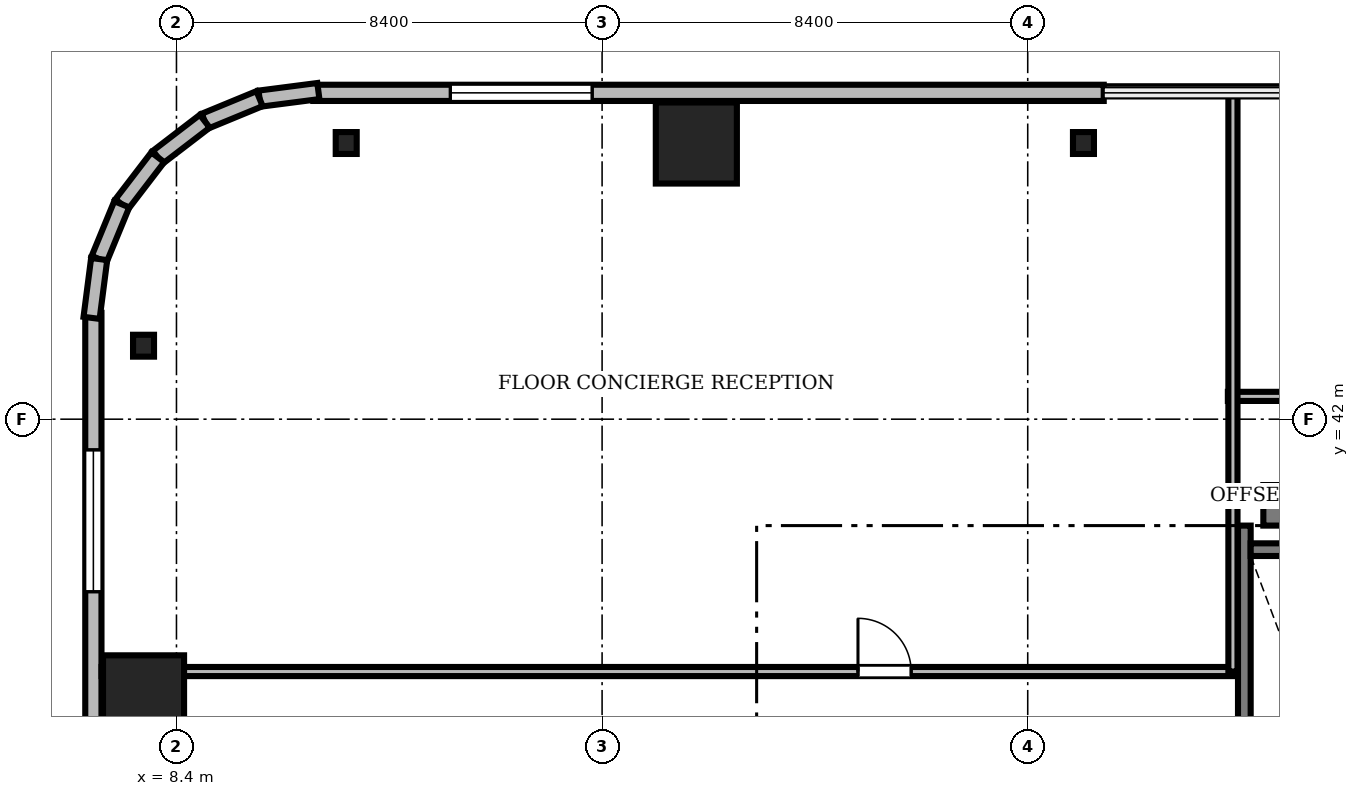
"""IFC4 building model, lengths in metres.
Left out: names, types, materials, properties, quantities, classifications, styles, units other than length and angle.
Written with IfcOpenShell. Run it as: python <this file> out.ifc"""

import sys

from ifc_helpers import new_model, si_unit, direction, frame, frame_2d, origin, origin_2d, place, context, subcontext, project, spatial, rectangle, i_section, extrude, source, transform, mapped, element, fill, save


model = new_model("IFC4")
c1 = context("Model", 3, precision=1e-05, world=origin(), true_north=direction((0.0, 1.0)))
c2 = subcontext(c1, "Body", "Model", "MODEL_VIEW")
j1 = project(units=[si_unit("LENGTHUNIT", "METRE"), si_unit("PLANEANGLEUNIT", "RADIAN")], contexts=[c1])
p1 = place(None, origin())
s1 = spatial("IfcSite", under=j1, at=p1, CompositionType="ELEMENT")
p2 = place(p1, origin())
s2 = spatial("IfcBuilding", under=s1, at=p2, CompositionType="ELEMENT")
p3 = place(p2, frame((0.0, 0.0, 155.7)))
s3 = spatial("IfcBuildingStorey", under=s2, at=p3, CompositionType="ELEMENT", Elevation=155.7)
m1 = source(origin(), c2, "Body", "SweptSolid", [
    extrude(rectangle(XDim=17.52, YDim=0.8, at=frame_2d((8.76, 0.0))), origin(), (0.0, 0.0, 1.0), 3.46),
])
p4 = place(p3, frame((29.85, 40.3, 0.0), z_axis=(0.0, 0.0, 1.0), x_axis=(1.0, 0.0, 0.0)))
e1 = element("IfcWall", 1, at=p4, inside=s3, PredefinedType="SHEAR", context=c2, shape_type="MappedRepresentation", body=[
    mapped(m1, transform((0.0, 0.0, 0.0), scale=1.0)),
])
m2 = source(origin(), c2, "Body", "SweptSolid", [
    extrude(rectangle(XDim=1.6, YDim=1.6, at=origin_2d()), origin(), (0.0, 0.0, 1.0), 3.46),
])
for number, where, z_axis, x_axis in (
    (2, (18.66, 47.45, 0.0), (0.0, 0.0, 1.0), (1.0, 0.0, 0.0)),
    (3, (7.75, 36.54, 0.0), (0.0, 0.0, 1.0), (1.0, 0.0, 0.0)),
):
    element("IfcColumn", number, at=place(p3, frame(where, z_axis=z_axis, x_axis=x_axis)), inside=s3, PredefinedType="COLUMN", context=c2, shape_type="MappedRepresentation", body=[
        mapped(m2, transform((0.0, 0.0, 0.0), scale=1.0)),
    ])
m3 = source(origin(), c2, "Body", "SweptSolid", [
    extrude(i_section(OverallWidth=0.414, OverallDepth=0.432, WebThickness=0.026, FlangeThickness=0.04, FilletRadius=0.015, at=origin_2d()), origin(), (0.0, 0.0, 1.0), 3.46),
])
for number, where, z_axis, x_axis in (
    (4, (26.3, 47.45, 0.0), (0.0, 0.0, 1.0), (1.0, 0.0, 0.0)),
    (5, (11.75, 47.45, 0.0), (0.0, 0.0, 1.0), (1.0, 0.0, 0.0)),
    (6, (7.75, 43.45, 0.0), (0.0, 0.0, 1.0), (1.0, 0.0, 0.0)),
):
    element("IfcColumn", number, at=place(p3, frame(where, z_axis=z_axis, x_axis=x_axis)), inside=s3, PredefinedType="COLUMN", context=c2, shape_type="MappedRepresentation", body=[
        mapped(m3, transform((0.0, 0.0, 0.0), scale=1.0)),
    ])
m4 = source(origin(), c2, "Body", "SweptSolid", [
    extrude(rectangle(XDim=15.6, YDim=0.32, at=frame_2d((7.8, 0.0))), origin(), (0.0, 0.0, 1.0), 3.46),
])
p5 = place(p3, frame((26.7, 48.44, 0.0), z_axis=(0.0, 0.0, 1.0), x_axis=(-1.0, 0.0, 0.0)))
e7 = element("IfcWall", 7, at=p5, inside=s3, PredefinedType="SOLIDWALL", context=c2, shape_type="MappedRepresentation", body=[
    mapped(m4, transform((0.0, 0.0, 0.0), scale=1.0)),
])
m5 = source(origin(), c2, "Body", "SweptSolid", [
    extrude(rectangle(XDim=2.8, YDim=2.4, at=frame_2d((1.4, 1.2))), frame((0.0, 0.17, 0.0), z_axis=(0.0, -1.0, 0.0), x_axis=(1.0, 0.0, 0.0)), (0.0, 0.0, 1.0), 0.34),
])
p6 = place(p5, frame((10.095, 0.0, 0.72)))
e8 = element("IfcOpeningElement", 8, at=p6, cuts=e7, PredefinedType="OPENING", context=c2, shape_type="MappedRepresentation", body=[
    mapped(m5, transform((0.0, 0.0, 0.0), scale=1.0)),
])
m6 = source(origin(), c2, "Body", "SweptSolid", [
    extrude(rectangle(XDim=15.6, YDim=0.32, at=frame_2d((7.8, 0.0))), origin(), (0.0, 0.0, 1.0), 3.46),
])
p7 = place(p3, frame((6.76, 44.1, 0.0), z_axis=(0.0, 0.0, 1.0), x_axis=(0.0, -1.0, 0.0)))
e9 = element("IfcWall", 9, at=p7, inside=s3, PredefinedType="SOLIDWALL", context=c2, shape_type="MappedRepresentation", body=[
    mapped(m6, transform((0.0, 0.0, 0.0), scale=1.0)),
])
m7 = source(origin(), c2, "Body", "SweptSolid", [
    extrude(rectangle(XDim=1.4, YDim=2.3, at=frame_2d((0.7, 1.15))), frame((0.0, 0.17, 0.0), z_axis=(0.0, -1.0, 0.0), x_axis=(1.0, 0.0, 0.0)), (0.0, 0.0, 1.0), 0.34),
])
p8 = place(p7, frame((9.61, 0.0, 0.0)))
e10 = element("IfcOpeningElement", 10, at=p8, cuts=e9, PredefinedType="OPENING", context=c2, shape_type="MappedRepresentation", body=[
    mapped(m7, transform((0.0, 0.0, 0.0), scale=1.0)),
])
p9 = place(p7, frame((2.705, 0.0, 0.72)))
e11 = element("IfcOpeningElement", 11, at=p9, cuts=e9, PredefinedType="OPENING", context=c2, shape_type="MappedRepresentation", body=[
    mapped(m5, transform((0.0, 0.0, 0.0), scale=1.0)),
])
m8 = source(origin(), c2, "Body", "SweptSolid", [
    extrude(rectangle(XDim=1.17, YDim=0.32, at=frame_2d((0.585, 0.0))), origin(), (0.0, 0.0, 1.0), 3.46),
])
p10 = place(p3, frame((11.2, 48.476, 0.0), z_axis=(0.0, 0.0, 1.0), x_axis=(-0.991735963317, -0.128295670475, 0.0)))
e12 = element("IfcWall", 12, at=p10, inside=s3, PredefinedType="SOLIDWALL", context=c2, shape_type="MappedRepresentation", body=[
    mapped(m8, transform((0.0, 0.0, 0.0), scale=1.0)),
])
m9 = source(origin(), c2, "Body", "SweptSolid", [
    extrude(rectangle(XDim=1.169, YDim=0.32, at=frame_2d((0.584, 0.0))), origin(), (0.0, 0.0, 1.0), 3.46),
])
p11 = place(p3, frame((10.04, 48.325, 0.0), z_axis=(0.0, 0.0, 1.0), x_axis=(-0.924552646638, -0.381054331552, 0.0)))
e13 = element("IfcWall", 13, at=p11, inside=s3, PredefinedType="SOLIDWALL", context=c2, shape_type="MappedRepresentation", body=[
    mapped(m9, transform((0.0, 0.0, 0.0), scale=1.0)),
])
m10 = source(origin(), c2, "Body", "SweptSolid", [
    extrude(rectangle(XDim=1.169, YDim=0.32, at=frame_2d((0.584, 0.0))), origin(), (0.0, 0.0, 1.0), 3.46),
])
p12 = place(p3, frame((8.959, 47.88, 0.0), z_axis=(0.0, 0.0, 1.0), x_axis=(-0.793663520347, -0.608356981114, 0.0)))
e14 = element("IfcWall", 14, at=p12, inside=s3, PredefinedType="SOLIDWALL", context=c2, shape_type="MappedRepresentation", body=[
    mapped(m10, transform((0.0, 0.0, 0.0), scale=1.0)),
])
m11 = source(origin(), c2, "Body", "SweptSolid", [
    extrude(rectangle(XDim=1.169, YDim=0.32, at=frame_2d((0.584, 0.0))), origin(), (0.0, 0.0, 1.0), 3.46),
])
p13 = place(p3, frame((8.031, 47.169, 0.0), z_axis=(0.0, 0.0, 1.0), x_axis=(-0.608387696831, -0.793639975269, 0.0)))
e15 = element("IfcWall", 15, at=p13, inside=s3, PredefinedType="SOLIDWALL", context=c2, shape_type="MappedRepresentation", body=[
    mapped(m11, transform((0.0, 0.0, 0.0), scale=1.0)),
])
p14 = place(p3, frame((7.32, 46.241, 0.0), z_axis=(0.0, 0.0, 1.0), x_axis=(-0.381054331552, -0.924552646638, 0.0)))
e16 = element("IfcWall", 16, at=p14, inside=s3, PredefinedType="SOLIDWALL", context=c2, shape_type="MappedRepresentation", body=[
    mapped(m9, transform((0.0, 0.0, 0.0), scale=1.0)),
])
p15 = place(p3, frame((6.875, 45.16, 0.0), z_axis=(0.0, 0.0, 1.0), x_axis=(-0.128295670475, -0.991735963317, 0.0)))
e17 = element("IfcWall", 17, at=p15, inside=s3, PredefinedType="SOLIDWALL", context=c2, shape_type="MappedRepresentation", body=[
    mapped(m8, transform((0.0, 0.0, 0.0), scale=1.0)),
])
m12 = source(origin(), c2, "Body", "SweptSolid", [
    extrude(rectangle(XDim=9.25, YDim=0.25, at=frame_2d((4.625, 0.0))), origin(), (0.0, 0.0, 1.0), 3.5),
])
p16 = place(p3, frame((29.475, 30.65, 0.0), z_axis=(0.0, 0.0, 1.0), x_axis=(0.0, 1.0, 0.0)))
e18 = element("IfcWall", 18, at=p16, inside=s3, PredefinedType="SOLIDWALL", context=c2, shape_type="MappedRepresentation", body=[
    mapped(m12, transform((0.0, 0.0, 0.0), scale=1.0)),
])
m13 = source(origin(), c2, "Body", "SweptSolid", [
    extrude(rectangle(XDim=3.15, YDim=0.25, at=frame_2d((1.575, 0.0))), origin(), (0.0, 0.0, 1.0), 3.5),
])
p17 = place(p3, frame((29.6, 39.425, 0.0), z_axis=(0.0, 0.0, 1.0), x_axis=(1.0, 0.0, 0.0)))
e19 = element("IfcWall", 19, at=p17, inside=s3, PredefinedType="SOLIDWALL", context=c2, shape_type="MappedRepresentation", body=[
    mapped(m13, transform((0.0, 0.0, 0.0), scale=1.0)),
])
m14 = source(origin(), c2, "Body", "SweptSolid", [
    extrude(rectangle(XDim=23.928, YDim=0.18, at=frame_2d((11.964, 0.0))), origin(), (0.0, 0.0, 1.0), 2.702),
])
p18 = place(p3, frame((29.15, 42.45, 0.0), z_axis=(0.0, 0.0, 1.0), x_axis=(1.0, 0.0, 0.0)))
e20 = element("IfcWall", 20, at=p18, inside=s3, PredefinedType="PARTITIONING", context=c2, shape_type="MappedRepresentation", body=[
    mapped(m14, transform((0.0, 0.0, 0.0), scale=1.0)),
])
m15 = source(origin(), c2, "Body", "SweptSolid", [
    extrude(rectangle(XDim=1.05, YDim=2.2, at=frame_2d((0.525, 1.1))), frame((0.0, 0.1, 0.0), z_axis=(0.0, -1.0, 0.0), x_axis=(1.0, 0.0, 0.0)), (0.0, 0.0, 1.0), 0.2),
])
p19 = place(p18, frame((4.5, 0.0, 0.0)))
e21 = element("IfcOpeningElement", 21, at=p19, cuts=e20, PredefinedType="OPENING", context=c2, shape_type="MappedRepresentation", body=[
    mapped(m15, transform((0.0, 0.0, 0.0), scale=1.0)),
])
m16 = source(origin(), c2, "Body", "SweptSolid", [
    extrude(rectangle(XDim=22.328, YDim=0.18, at=frame_2d((11.164, 0.0))), origin(), (0.0, 0.0, 1.0), 2.702),
])
p20 = place(p3, frame((6.922, 37.02, 0.0), z_axis=(0.0, 0.0, 1.0), x_axis=(1.0, 0.0, 0.0)))
e22 = element("IfcWall", 22, at=p20, inside=s3, PredefinedType="PARTITIONING", context=c2, shape_type="MappedRepresentation", body=[
    mapped(m16, transform((0.0, 0.0, 0.0), scale=1.0)),
])
p21 = place(p20, frame((14.928, 0.0, 0.0)))
e23 = element("IfcOpeningElement", 23, at=p21, cuts=e22, PredefinedType="OPENING", context=c2, shape_type="MappedRepresentation", body=[
    mapped(m15, transform((0.0, 0.0, 0.0), scale=1.0)),
])
m17 = source(origin(), c2, "Body", "SweptSolid", [
    extrude(rectangle(XDim=11.45, YDim=0.18, at=frame_2d((5.725, 0.0))), origin(), (0.0, 0.0, 1.0), 2.702),
])
p22 = place(p3, frame((29.25, 37.02, 0.0), z_axis=(0.0, 0.0, 1.0), x_axis=(0.0, 1.0, 0.0)))
e24 = element("IfcWall", 24, at=p22, inside=s3, PredefinedType="PARTITIONING", context=c2, shape_type="MappedRepresentation", body=[
    mapped(m17, transform((0.0, 0.0, 0.0), scale=1.0)),
])
m18 = source(origin(), c2, "Body", "SweptSolid", [
    extrude(rectangle(XDim=2.8, YDim=2.4, at=frame_2d((1.4, 1.2))), frame((0.0, 0.03, 0.0), z_axis=(0.0, -1.0, 0.0), x_axis=(1.0, 0.0, 0.0)), (0.0, 0.0, 1.0), 0.06),
])
p23 = place(p6, origin())
e25 = element("IfcWindow", 25, at=p23, inside=s3, PartitioningType="SINGLE_PANEL", PredefinedType="WINDOW", context=c2, shape_type="MappedRepresentation", body=[
    mapped(m18, transform((0.0, 0.0, 0.0), scale=1.0)),
])
fill(e8, e25)
p24 = place(p9, origin())
e26 = element("IfcWindow", 26, at=p24, inside=s3, PartitioningType="SINGLE_PANEL", PredefinedType="WINDOW", context=c2, shape_type="MappedRepresentation", body=[
    mapped(m18, transform((0.0, 0.0, 0.0), scale=1.0)),
])
fill(e11, e26)
m19 = source(origin(), c2, "Body", "SweptSolid", [
    extrude(rectangle(XDim=1.05, YDim=2.2, at=frame_2d((0.525, 1.1))), frame((0.0, 0.025, 0.0), z_axis=(0.0, -1.0, 0.0), x_axis=(1.0, 0.0, 0.0)), (0.0, 0.0, 1.0), 0.05),
])
p25 = place(p21, origin())
e27 = element("IfcDoor", 27, at=p25, inside=s3, OperationType="SINGLE_SWING_LEFT", PredefinedType="DOOR", context=c2, shape_type="MappedRepresentation", body=[
    mapped(m19, transform((0.0, 0.0, 0.0), scale=1.0)),
])
fill(e23, e27)
save(model, sys.argv[1])
